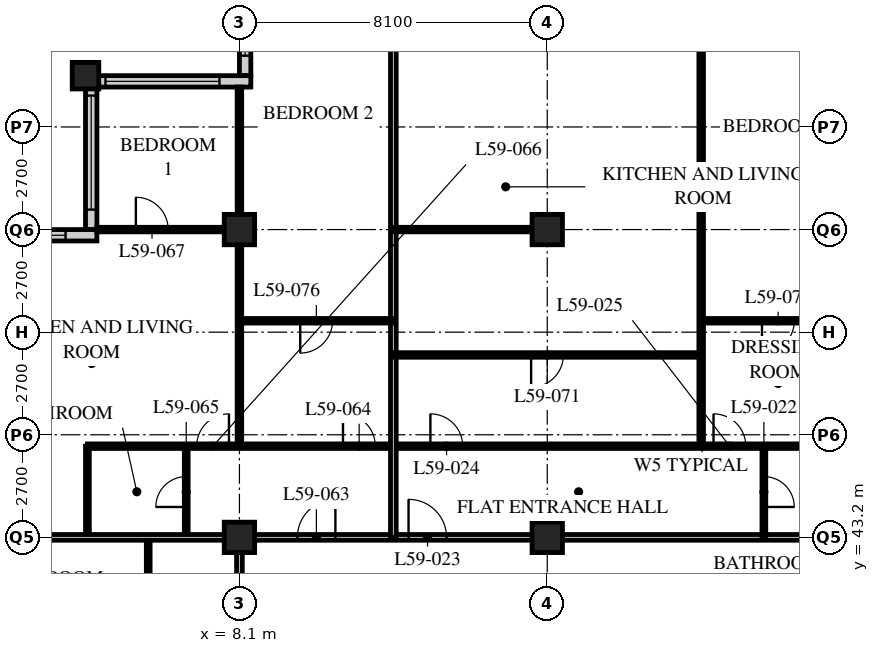
"""IFC4 building model, lengths in metres.
Left out: names, types, materials, properties, quantities, classifications, styles, units other than length and angle.
Written with IfcOpenShell. Run it as: python <this file> out.ifc"""

import sys

from ifc_helpers import new_model, si_unit, direction, frame, frame_2d, origin, origin_2d, place, context, subcontext, project, spatial, rectangle, hollow_rectangle, extrude, element, fill, save


model = new_model("IFC4")
c1 = context("Model", 3, precision=1e-05, world=origin(), true_north=direction((0.0, 1.0)))
c2 = subcontext(c1, "Body", "Model", "MODEL_VIEW")
j1 = project(units=[si_unit("LENGTHUNIT", "METRE"), si_unit("PLANEANGLEUNIT", "RADIAN")], contexts=[c1])
p1 = place(None, origin())
s1 = spatial("IfcSite", under=j1, at=p1, CompositionType="ELEMENT")
p2 = place(p1, origin())
s2 = spatial("IfcBuilding", under=s1, at=p2, CompositionType="ELEMENT")
p3 = place(p2, frame((0.0, 0.0, 228.0)))
s3 = spatial("IfcBuildingStorey", under=s2, at=p3, CompositionType="ELEMENT", Elevation=228.0)
p4 = place(p3, frame((4.05, 55.35, 0.0), z_axis=(0.0, 0.0, 1.0), x_axis=(1.0, 0.0, 0.0)))
e1 = element("IfcColumn", 1, at=p4, inside=s3, PredefinedType="COLUMN", context=c2, shape_type="SweptSolid", body=[
    extrude(hollow_rectangle(XDim=0.7, YDim=0.7, WallThickness=0.07, at=origin_2d()), origin(), (0.0, 0.0, 1.0), 3.6),
])
for number, where, z_axis, x_axis in (
    (2, (8.1, 43.2, 0.0), (0.0, 0.0, 1.0), (1.0, 0.0, 0.0)),
    (3, (8.1, 51.3, 0.0), (0.0, 0.0, 1.0), (1.0, 0.0, 0.0)),
    (4, (16.2, 43.2, 0.0), (0.0, 0.0, 1.0), (1.0, 0.0, 0.0)),
    (5, (16.2, 51.3, 0.0), (0.0, 0.0, 1.0), (1.0, 0.0, 0.0)),
):
    element("IfcColumn", number, at=place(p3, frame(where, z_axis=z_axis, x_axis=x_axis)), inside=s3, PredefinedType="COLUMN", context=c2, shape_type="SweptSolid", body=[
        extrude(hollow_rectangle(XDim=0.8, YDim=0.8, WallThickness=0.08, at=origin_2d()), origin(), (0.0, 0.0, 1.0), 3.6),
    ])
p5 = place(p3, frame((8.25, 59.1, 0.0), z_axis=(0.0, 0.0, 1.0), x_axis=(0.0, -1.0, 0.0)))
e6 = element("IfcWall", 6, at=p5, inside=s3, PredefinedType="SOLIDWALL", context=c2, shape_type="SweptSolid", body=[
    extrude(rectangle(XDim=3.75, YDim=0.3, at=frame_2d((1.875, 0.0))), origin(), (0.0, 0.0, 1.0), 3.39),
])
p6 = place(p5, frame((0.225, 0.0, 0.6)))
e7 = element("IfcOpeningElement", 7, at=p6, cuts=e6, PredefinedType="OPENING", context=c2, shape_type="SweptSolid", body=[
    extrude(rectangle(XDim=3.0, YDim=2.0, at=frame_2d((1.5, 1.0))), frame((0.0, 0.16, 0.0), z_axis=(0.0, -1.0, 0.0), x_axis=(1.0, 0.0, 0.0)), (0.0, 0.0, 1.0), 0.32),
])
p7 = place(p3, frame((8.4, 55.2, 0.0), z_axis=(0.0, 0.0, 1.0), x_axis=(-1.0, 0.0, 0.0)))
e8 = element("IfcWall", 8, at=p7, inside=s3, PredefinedType="SOLIDWALL", context=c2, shape_type="SweptSolid", body=[
    extrude(rectangle(XDim=4.35, YDim=0.3, at=frame_2d((2.175, 0.0))), origin(), (0.0, 0.0, 1.0), 3.39),
])
p8 = place(p7, frame((0.825, 0.0, 0.6)))
e9 = element("IfcOpeningElement", 9, at=p8, cuts=e8, PredefinedType="OPENING", context=c2, shape_type="SweptSolid", body=[
    extrude(rectangle(XDim=3.0, YDim=2.0, at=frame_2d((1.5, 1.0))), frame((0.0, 0.16, 0.0), z_axis=(0.0, -1.0, 0.0), x_axis=(1.0, 0.0, 0.0)), (0.0, 0.0, 1.0), 0.32),
])
p9 = place(p3, frame((4.2, 55.05, 0.0), z_axis=(0.0, 0.0, 1.0), x_axis=(0.0, -1.0, 0.0)))
e10 = element("IfcWall", 10, at=p9, inside=s3, PredefinedType="SOLIDWALL", context=c2, shape_type="SweptSolid", body=[
    extrude(rectangle(XDim=3.75, YDim=0.3, at=frame_2d((1.875, 0.0))), origin(), (0.0, 0.0, 1.0), 3.39),
])
p10 = place(p9, frame((0.225, 0.0, 0.6)))
e11 = element("IfcOpeningElement", 11, at=p10, cuts=e10, PredefinedType="OPENING", context=c2, shape_type="SweptSolid", body=[
    extrude(rectangle(XDim=3.0, YDim=2.0, at=frame_2d((1.5, 1.0))), frame((0.0, 0.16, 0.0), z_axis=(0.0, -1.0, 0.0), x_axis=(1.0, 0.0, 0.0)), (0.0, 0.0, 1.0), 0.32),
])
p11 = place(p3, frame((4.35, 51.15, 0.0), z_axis=(0.0, 0.0, 1.0), x_axis=(-1.0, 0.0, 0.0)))
e12 = element("IfcWall", 12, at=p11, inside=s3, PredefinedType="SOLIDWALL", context=c2, shape_type="SweptSolid", body=[
    extrude(rectangle(XDim=4.35, YDim=0.3, at=frame_2d((2.175, 0.0))), origin(), (0.0, 0.0, 1.0), 3.39),
])
p12 = place(p11, frame((0.825, 0.0, 0.6)))
e13 = element("IfcOpeningElement", 13, at=p12, cuts=e12, PredefinedType="OPENING", context=c2, shape_type="SweptSolid", body=[
    extrude(rectangle(XDim=3.0, YDim=2.0, at=frame_2d((1.5, 1.0))), frame((0.0, 0.16, 0.0), z_axis=(0.0, -1.0, 0.0), x_axis=(1.0, 0.0, 0.0)), (0.0, 0.0, 1.0), 0.32),
])
p13 = place(p3, frame((8.1, 43.2, 0.0), z_axis=(0.0, 0.0, 1.0), x_axis=(1.0, 0.0, 0.0)))
e14 = element("IfcWall", 14, at=p13, inside=s3, PredefinedType="PARTITIONING", context=c2, shape_type="SweptSolid", body=[
    extrude(rectangle(XDim=36.45, YDim=0.15, at=frame_2d((18.225, 0.0))), origin(), (0.0, 0.0, 1.0), 2.628),
])
p14 = place(p13, frame((4.45, 0.0, 0.0)))
e15 = element("IfcOpeningElement", 15, at=p14, cuts=e14, PredefinedType="OPENING", context=c2, shape_type="SweptSolid", body=[
    extrude(rectangle(XDim=1.0, YDim=2.1, at=frame_2d((0.5, 1.05))), frame((0.0, 0.085, 0.0), z_axis=(0.0, -1.0, 0.0), x_axis=(1.0, 0.0, 0.0)), (0.0, 0.0, 1.0), 0.17),
])
p15 = place(p13, frame((17.1, 0.0, 0.0)))
e16 = element("IfcOpeningElement", 16, at=p15, cuts=e14, PredefinedType="OPENING", context=c2, shape_type="SweptSolid", body=[
    extrude(rectangle(XDim=1.0, YDim=2.1, at=frame_2d((0.5, 1.05))), frame((0.0, 0.085, 0.0), z_axis=(0.0, -1.0, 0.0), x_axis=(1.0, 0.0, 0.0)), (0.0, 0.0, 1.0), 0.17),
])
p16 = place(p13, frame((29.05, 0.0, 0.0)))
e17 = element("IfcOpeningElement", 17, at=p16, cuts=e14, PredefinedType="OPENING", context=c2, shape_type="SweptSolid", body=[
    extrude(rectangle(XDim=1.0, YDim=2.1, at=frame_2d((0.5, 1.05))), frame((0.0, 0.085, 0.0), z_axis=(0.0, -1.0, 0.0), x_axis=(1.0, 0.0, 0.0)), (0.0, 0.0, 1.0), 0.17),
])
p17 = place(p13, frame((33.925, 0.0, 0.0)))
e18 = element("IfcOpeningElement", 18, at=p17, cuts=e14, PredefinedType="OPENING", context=c2, shape_type="SweptSolid", body=[
    extrude(rectangle(XDim=1.0, YDim=2.1, at=frame_2d((0.5, 1.05))), frame((0.0, 0.085, 0.0), z_axis=(0.0, -1.0, 0.0), x_axis=(1.0, 0.0, 0.0)), (0.0, 0.0, 1.0), 0.17),
])
p18 = place(p13, frame((1.525, 0.0, 0.0)))
e19 = element("IfcOpeningElement", 19, at=p18, cuts=e14, PredefinedType="OPENING", context=c2, shape_type="SweptSolid", body=[
    extrude(rectangle(XDim=1.0, YDim=2.1, at=frame_2d((0.5, 1.05))), frame((0.0, 0.085, 0.0), z_axis=(0.0, -1.0, 0.0), x_axis=(1.0, 0.0, 0.0)), (0.0, 0.0, 1.0), 0.17),
])
p19 = place(p3, frame((8.1, 18.9, 0.0), z_axis=(0.0, 0.0, 1.0), x_axis=(0.0, 1.0, 0.0)))
e20 = element("IfcWall", 20, at=p19, inside=s3, PredefinedType="PARTITIONING", context=c2, shape_type="SweptSolid", body=[
    extrude(rectangle(XDim=24.3, YDim=0.15, at=frame_2d((12.15, 0.0))), origin(), (0.0, 0.0, 1.0), 2.628),
])
p20 = place(p19, frame((0.9, 0.0, 0.0)))
e21 = element("IfcOpeningElement", 21, at=p20, cuts=e20, PredefinedType="OPENING", context=c2, shape_type="SweptSolid", body=[
    extrude(rectangle(XDim=1.0, YDim=2.1, at=frame_2d((0.5, 1.05))), frame((0.0, 0.085, 0.0), z_axis=(0.0, -1.0, 0.0), x_axis=(1.0, 0.0, 0.0)), (0.0, 0.0, 1.0), 0.17),
])
p21 = place(p19, frame((20.95, 0.0, 0.0)))
e22 = element("IfcOpeningElement", 22, at=p21, cuts=e20, PredefinedType="OPENING", context=c2, shape_type="SweptSolid", body=[
    extrude(rectangle(XDim=1.0, YDim=2.1, at=frame_2d((0.5, 1.05))), frame((0.0, 0.085, 0.0), z_axis=(0.0, -1.0, 0.0), x_axis=(1.0, 0.0, 0.0)), (0.0, 0.0, 1.0), 0.17),
])
p22 = place(p3, frame((21.9, 43.2, 0.0), z_axis=(0.0, 0.0, 1.0), x_axis=(0.0, 1.0, 0.0)))
e23 = element("IfcWall", 23, at=p22, inside=s3, PredefinedType="PARTITIONING", context=c2, shape_type="SweptSolid", body=[
    extrude(rectangle(XDim=2.4, YDim=0.1, at=frame_2d((1.2, 0.0))), origin(), (0.0, 0.0, 1.0), 3.39),
])
p23 = place(p22, frame((0.8, 0.0, 0.0)))
e24 = element("IfcOpeningElement", 24, at=p23, cuts=e23, PredefinedType="OPENING", context=c2, shape_type="SweptSolid", body=[
    extrude(rectangle(XDim=0.8, YDim=2.1, at=frame_2d((0.4, 1.05))), frame((0.0, 0.06, 0.0), z_axis=(0.0, -1.0, 0.0), x_axis=(1.0, 0.0, 0.0)), (0.0, 0.0, 1.0), 0.12),
])
p24 = place(p3, frame((20.25, 45.6, 0.0), z_axis=(0.0, 0.0, 1.0), x_axis=(0.0, 1.0, 0.0)))
e25 = element("IfcWall", 25, at=p24, inside=s3, PredefinedType="PARTITIONING", context=c2, shape_type="SweptSolid", body=[
    extrude(rectangle(XDim=13.5, YDim=0.12, at=frame_2d((6.75, 0.0))), origin(), (0.0, 0.0, 1.0), 3.39),
])
p25 = place(p3, frame((5.7, 41.0, 0.0), z_axis=(0.0, 0.0, 1.0), x_axis=(0.0, 1.0, 0.0)))
e26 = element("IfcWall", 26, at=p25, inside=s3, PredefinedType="PARTITIONING", context=c2, shape_type="SweptSolid", body=[
    extrude(rectangle(XDim=2.2, YDim=0.1, at=frame_2d((1.1, 0.0))), origin(), (0.0, 0.0, 1.0), 3.39),
])
p26 = place(p3, frame((6.7, 43.2, 0.0), z_axis=(0.0, 0.0, 1.0), x_axis=(0.0, 1.0, 0.0)))
e27 = element("IfcWall", 27, at=p26, inside=s3, PredefinedType="PARTITIONING", context=c2, shape_type="SweptSolid", body=[
    extrude(rectangle(XDim=2.4, YDim=0.1, at=frame_2d((1.2, 0.0))), origin(), (0.0, 0.0, 1.0), 3.39),
])
p27 = place(p26, frame((0.8, 0.0, 0.0)))
e28 = element("IfcOpeningElement", 28, at=p27, cuts=e27, PredefinedType="OPENING", context=c2, shape_type="SweptSolid", body=[
    extrude(rectangle(XDim=0.8, YDim=2.1, at=frame_2d((0.4, 1.05))), frame((0.0, 0.06, 0.0), z_axis=(0.0, -1.0, 0.0), x_axis=(1.0, 0.0, 0.0)), (0.0, 0.0, 1.0), 0.12),
])
p28 = place(p3, frame((4.1, 43.2, 0.0), z_axis=(0.0, 0.0, 1.0), x_axis=(0.0, 1.0, 0.0)))
e29 = element("IfcWall", 29, at=p28, inside=s3, PredefinedType="PARTITIONING", context=c2, shape_type="SweptSolid", body=[
    extrude(rectangle(XDim=2.4, YDim=0.1, at=frame_2d((1.2, 0.0))), origin(), (0.0, 0.0, 1.0), 3.39),
])
p29 = place(p3, frame((4.1, 45.6, 0.0), z_axis=(0.0, 0.0, 1.0), x_axis=(1.0, 0.0, 0.0)))
e30 = element("IfcWall", 30, at=p29, inside=s3, PredefinedType="PARTITIONING", context=c2, shape_type="SweptSolid", body=[
    extrude(rectangle(XDim=32.35, YDim=0.12, at=frame_2d((16.175, 0.0))), origin(), (0.0, 0.0, 1.0), 3.39),
])
p30 = place(p29, frame((9.025, 0.0, 0.0)))
e31 = element("IfcOpeningElement", 31, at=p30, cuts=e30, PredefinedType="OPENING", context=c2, shape_type="SweptSolid", body=[
    extrude(rectangle(XDim=0.85, YDim=2.1, at=frame_2d((0.425, 1.05))), frame((0.0, 0.07, 0.0), z_axis=(0.0, -1.0, 0.0), x_axis=(1.0, 0.0, 0.0)), (0.0, 0.0, 1.0), 0.14),
])
p31 = place(p29, frame((16.475, 0.0, 0.0)))
e32 = element("IfcOpeningElement", 32, at=p31, cuts=e30, PredefinedType="OPENING", context=c2, shape_type="SweptSolid", body=[
    extrude(rectangle(XDim=0.85, YDim=2.1, at=frame_2d((0.425, 1.05))), frame((0.0, 0.07, 0.0), z_axis=(0.0, -1.0, 0.0), x_axis=(1.0, 0.0, 0.0)), (0.0, 0.0, 1.0), 0.14),
])
p32 = place(p29, frame((21.175, 0.0, 0.0)))
e33 = element("IfcOpeningElement", 33, at=p32, cuts=e30, PredefinedType="OPENING", context=c2, shape_type="SweptSolid", body=[
    extrude(rectangle(XDim=0.85, YDim=2.1, at=frame_2d((0.425, 1.05))), frame((0.0, 0.07, 0.0), z_axis=(0.0, -1.0, 0.0), x_axis=(1.0, 0.0, 0.0)), (0.0, 0.0, 1.0), 0.14),
])
p33 = place(p29, frame((28.625, 0.0, 0.0)))
e34 = element("IfcOpeningElement", 34, at=p33, cuts=e30, PredefinedType="OPENING", context=c2, shape_type="SweptSolid", body=[
    extrude(rectangle(XDim=0.85, YDim=2.1, at=frame_2d((0.425, 1.05))), frame((0.0, 0.07, 0.0), z_axis=(0.0, -1.0, 0.0), x_axis=(1.0, 0.0, 0.0)), (0.0, 0.0, 1.0), 0.14),
])
p34 = place(p29, frame((6.725, 0.0, 0.0)))
e35 = element("IfcOpeningElement", 35, at=p34, cuts=e30, PredefinedType="OPENING", context=c2, shape_type="SweptSolid", body=[
    extrude(rectangle(XDim=0.85, YDim=2.1, at=frame_2d((0.425, 1.05))), frame((0.0, 0.07, 0.0), z_axis=(0.0, -1.0, 0.0), x_axis=(1.0, 0.0, 0.0)), (0.0, 0.0, 1.0), 0.14),
])
p35 = place(p29, frame((2.875, 0.0, 0.0)))
e36 = element("IfcOpeningElement", 36, at=p35, cuts=e30, PredefinedType="OPENING", context=c2, shape_type="SweptSolid", body=[
    extrude(rectangle(XDim=0.85, YDim=2.1, at=frame_2d((0.425, 1.05))), frame((0.0, 0.07, 0.0), z_axis=(0.0, -1.0, 0.0), x_axis=(1.0, 0.0, 0.0)), (0.0, 0.0, 1.0), 0.14),
])
p36 = place(p3, frame((8.1, 45.6, 0.0), z_axis=(0.0, 0.0, 1.0), x_axis=(0.0, 1.0, 0.0)))
e37 = element("IfcWall", 37, at=p36, inside=s3, PredefinedType="PARTITIONING", context=c2, shape_type="SweptSolid", body=[
    extrude(rectangle(XDim=9.45, YDim=0.12, at=frame_2d((4.725, 0.0))), origin(), (0.0, 0.0, 1.0), 2.628),
])
p37 = place(p3, frame((8.1, 51.3, 0.0), z_axis=(0.0, 0.0, 1.0), x_axis=(-1.0, 0.0, 0.0)))
e38 = element("IfcWall", 38, at=p37, inside=s3, PredefinedType="PARTITIONING", context=c2, shape_type="SweptSolid", body=[
    extrude(rectangle(XDim=3.75, YDim=0.12, at=frame_2d((1.875, 0.0))), origin(), (0.0, 0.0, 1.0), 2.628),
])
p38 = place(p37, frame((1.875, 0.0, 0.0)))
e39 = element("IfcOpeningElement", 39, at=p38, cuts=e38, PredefinedType="OPENING", context=c2, shape_type="SweptSolid", body=[
    extrude(rectangle(XDim=0.85, YDim=2.1, at=frame_2d((0.425, 1.05))), frame((0.0, 0.07, 0.0), z_axis=(0.0, -1.0, 0.0), x_axis=(1.0, 0.0, 0.0)), (0.0, 0.0, 1.0), 0.14),
])
p39 = place(p3, frame((0.3, 43.2, 0.0), z_axis=(0.0, 0.0, 1.0), x_axis=(1.0, 0.0, 0.0)))
e40 = element("IfcWall", 40, at=p39, inside=s3, PredefinedType="PARTITIONING", context=c2, shape_type="SweptSolid", body=[
    extrude(rectangle(XDim=7.8, YDim=0.15, at=frame_2d((3.9, 0.0))), origin(), (0.0, 0.0, 1.0), 2.628),
])
p40 = place(p3, frame((12.15, 43.2, 0.0), z_axis=(0.0, 0.0, 1.0), x_axis=(0.0, 1.0, 0.0)))
e41 = element("IfcWall", 41, at=p40, inside=s3, PredefinedType="PARTITIONING", context=c2, shape_type="SweptSolid", body=[
    extrude(rectangle(XDim=15.9, YDim=0.15, at=frame_2d((7.95, 0.0))), origin(), (0.0, 0.0, 1.0), 3.39),
])
p41 = place(p3, frame((12.15, 48.0, 0.0), z_axis=(0.0, 0.0, 1.0), x_axis=(1.0, 0.0, 0.0)))
e42 = element("IfcWall", 42, at=p41, inside=s3, PredefinedType="PARTITIONING", context=c2, shape_type="SweptSolid", body=[
    extrude(rectangle(XDim=8.1, YDim=0.12, at=frame_2d((4.05, 0.0))), origin(), (0.0, 0.0, 1.0), 3.39),
])
p42 = place(p41, frame((3.625, 0.0, 0.0)))
e43 = element("IfcOpeningElement", 43, at=p42, cuts=e42, PredefinedType="OPENING", context=c2, shape_type="SweptSolid", body=[
    extrude(rectangle(XDim=0.85, YDim=2.1, at=frame_2d((0.425, 1.05))), frame((0.0, 0.07, 0.0), z_axis=(0.0, -1.0, 0.0), x_axis=(1.0, 0.0, 0.0)), (0.0, 0.0, 1.0), 0.14),
])
p43 = place(p3, frame((20.25, 48.9, 0.0), z_axis=(0.0, 0.0, 1.0), x_axis=(1.0, 0.0, 0.0)))
e44 = element("IfcWall", 44, at=p43, inside=s3, PredefinedType="PARTITIONING", context=c2, shape_type="SweptSolid", body=[
    extrude(rectangle(XDim=4.05, YDim=0.12, at=frame_2d((2.025, 0.0))), origin(), (0.0, 0.0, 1.0), 3.39),
])
p44 = place(p43, frame((1.6, 0.0, 0.0)))
e45 = element("IfcOpeningElement", 45, at=p44, cuts=e44, PredefinedType="OPENING", context=c2, shape_type="SweptSolid", body=[
    extrude(rectangle(XDim=0.85, YDim=2.1, at=frame_2d((0.425, 1.05))), frame((0.0, 0.07, 0.0), z_axis=(0.0, -1.0, 0.0), x_axis=(1.0, 0.0, 0.0)), (0.0, 0.0, 1.0), 0.14),
])
p45 = place(p3, frame((8.1, 48.9, 0.0), z_axis=(0.0, 0.0, 1.0), x_axis=(1.0, 0.0, 0.0)))
e46 = element("IfcWall", 46, at=p45, inside=s3, PredefinedType="PARTITIONING", context=c2, shape_type="SweptSolid", body=[
    extrude(rectangle(XDim=4.05, YDim=0.12, at=frame_2d((2.025, 0.0))), origin(), (0.0, 0.0, 1.0), 3.39),
])
p46 = place(p45, frame((1.6, 0.0, 0.0)))
e47 = element("IfcOpeningElement", 47, at=p46, cuts=e46, PredefinedType="OPENING", context=c2, shape_type="SweptSolid", body=[
    extrude(rectangle(XDim=0.85, YDim=2.1, at=frame_2d((0.425, 1.05))), frame((0.0, 0.07, 0.0), z_axis=(0.0, -1.0, 0.0), x_axis=(1.0, 0.0, 0.0)), (0.0, 0.0, 1.0), 0.14),
])
p47 = place(p3, frame((12.15, 51.3, 0.0), z_axis=(0.0, 0.0, 1.0), x_axis=(1.0, 0.0, 0.0)))
e48 = element("IfcWall", 48, at=p47, inside=s3, PredefinedType="PARTITIONING", context=c2, shape_type="SweptSolid", body=[
    extrude(rectangle(XDim=3.65, YDim=0.12, at=frame_2d((1.825, 0.0))), origin(), (0.0, 0.0, 1.0), 2.628),
])
p48 = place(p6, origin())
e49 = element("IfcWindow", 49, at=p48, inside=s3, PartitioningType="SINGLE_PANEL", PredefinedType="WINDOW", context=c2, shape_type="SweptSolid", body=[
    extrude(rectangle(XDim=3.0, YDim=2.0, at=frame_2d((1.5, 1.0))), frame((0.0, 0.03, 0.0), z_axis=(0.0, -1.0, 0.0), x_axis=(1.0, 0.0, 0.0)), (0.0, 0.0, 1.0), 0.06),
])
fill(e7, e49)
p49 = place(p8, origin())
e50 = element("IfcWindow", 50, at=p49, inside=s3, PartitioningType="SINGLE_PANEL", PredefinedType="WINDOW", context=c2, shape_type="SweptSolid", body=[
    extrude(rectangle(XDim=3.0, YDim=2.0, at=frame_2d((1.5, 1.0))), frame((0.0, 0.03, 0.0), z_axis=(0.0, -1.0, 0.0), x_axis=(1.0, 0.0, 0.0)), (0.0, 0.0, 1.0), 0.06),
])
fill(e9, e50)
p50 = place(p10, origin())
e51 = element("IfcWindow", 51, at=p50, inside=s3, PartitioningType="SINGLE_PANEL", PredefinedType="WINDOW", context=c2, shape_type="SweptSolid", body=[
    extrude(rectangle(XDim=3.0, YDim=2.0, at=frame_2d((1.5, 1.0))), frame((0.0, 0.03, 0.0), z_axis=(0.0, -1.0, 0.0), x_axis=(1.0, 0.0, 0.0)), (0.0, 0.0, 1.0), 0.06),
])
fill(e11, e51)
p51 = place(p12, origin())
e52 = element("IfcWindow", 52, at=p51, inside=s3, PartitioningType="SINGLE_PANEL", PredefinedType="WINDOW", context=c2, shape_type="SweptSolid", body=[
    extrude(rectangle(XDim=3.0, YDim=2.0, at=frame_2d((1.5, 1.0))), frame((0.0, 0.03, 0.0), z_axis=(0.0, -1.0, 0.0), x_axis=(1.0, 0.0, 0.0)), (0.0, 0.0, 1.0), 0.06),
])
fill(e13, e52)
p52 = place(p23, origin())
e53 = element("IfcDoor", 53, at=p52, inside=s3, OperationType="SINGLE_SWING_RIGHT", PredefinedType="DOOR", context=c2, shape_type="SweptSolid", body=[
    extrude(rectangle(XDim=0.8, YDim=2.1, at=frame_2d((0.4, 1.05))), frame((0.0, 0.025, 0.0), z_axis=(0.0, -1.0, 0.0), x_axis=(1.0, 0.0, 0.0)), (0.0, 0.0, 1.0), 0.05),
])
fill(e24, e53)
p53 = place(p14, origin())
e54 = element("IfcDoor", 54, at=p53, inside=s3, OperationType="SINGLE_SWING_LEFT", PredefinedType="DOOR", context=c2, shape_type="SweptSolid", body=[
    extrude(rectangle(XDim=1.0, YDim=2.1, at=frame_2d((0.5, 1.05))), frame((0.0, 0.025, 0.0), z_axis=(0.0, -1.0, 0.0), x_axis=(1.0, 0.0, 0.0)), (0.0, 0.0, 1.0), 0.05),
])
fill(e15, e54)
p54 = place(p30, origin())
e55 = element("IfcDoor", 55, at=p54, inside=s3, OperationType="SINGLE_SWING_LEFT", PredefinedType="DOOR", context=c2, shape_type="SweptSolid", body=[
    extrude(rectangle(XDim=0.85, YDim=2.1, at=frame_2d((0.425, 1.05))), frame((0.0, 0.025, 0.0), z_axis=(0.0, -1.0, 0.0), x_axis=(1.0, 0.0, 0.0)), (0.0, 0.0, 1.0), 0.05),
])
fill(e31, e55)
p55 = place(p31, origin())
e56 = element("IfcDoor", 56, at=p55, inside=s3, OperationType="SINGLE_SWING_LEFT", PredefinedType="DOOR", context=c2, shape_type="SweptSolid", body=[
    extrude(rectangle(XDim=0.85, YDim=2.1, at=frame_2d((0.425, 1.05))), frame((0.0, 0.025, 0.0), z_axis=(0.0, -1.0, 0.0), x_axis=(1.0, 0.0, 0.0)), (0.0, 0.0, 1.0), 0.05),
])
fill(e32, e56)
p56 = place(p18, origin())
e57 = element("IfcDoor", 57, at=p56, inside=s3, OperationType="SINGLE_SWING_RIGHT", PredefinedType="DOOR", context=c2, shape_type="SweptSolid", body=[
    extrude(rectangle(XDim=1.0, YDim=2.1, at=frame_2d((0.5, 1.05))), frame((0.0, 0.025, 0.0), z_axis=(0.0, -1.0, 0.0), x_axis=(1.0, 0.0, 0.0)), (0.0, 0.0, 1.0), 0.05),
])
fill(e19, e57)
p57 = place(p34, origin())
e58 = element("IfcDoor", 58, at=p57, inside=s3, OperationType="SINGLE_SWING_LEFT", PredefinedType="DOOR", context=c2, shape_type="SweptSolid", body=[
    extrude(rectangle(XDim=0.85, YDim=2.1, at=frame_2d((0.425, 1.05))), frame((0.0, 0.025, 0.0), z_axis=(0.0, -1.0, 0.0), x_axis=(1.0, 0.0, 0.0)), (0.0, 0.0, 1.0), 0.05),
])
fill(e35, e58)
p58 = place(p27, origin())
e59 = element("IfcDoor", 59, at=p58, inside=s3, OperationType="SINGLE_SWING_LEFT", PredefinedType="DOOR", context=c2, shape_type="SweptSolid", body=[
    extrude(rectangle(XDim=0.8, YDim=2.1, at=frame_2d((0.4, 1.05))), frame((0.0, 0.025, 0.0), z_axis=(0.0, -1.0, 0.0), x_axis=(1.0, 0.0, 0.0)), (0.0, 0.0, 1.0), 0.05),
])
fill(e28, e59)
p59 = place(p35, origin())
e60 = element("IfcDoor", 60, at=p59, inside=s3, OperationType="SINGLE_SWING_RIGHT", PredefinedType="DOOR", context=c2, shape_type="SweptSolid", body=[
    extrude(rectangle(XDim=0.85, YDim=2.1, at=frame_2d((0.425, 1.05))), frame((0.0, 0.025, 0.0), z_axis=(0.0, -1.0, 0.0), x_axis=(1.0, 0.0, 0.0)), (0.0, 0.0, 1.0), 0.05),
])
fill(e36, e60)
p60 = place(p38, origin())
e61 = element("IfcDoor", 61, at=p60, inside=s3, OperationType="SINGLE_SWING_LEFT", PredefinedType="DOOR", context=c2, shape_type="SweptSolid", body=[
    extrude(rectangle(XDim=0.85, YDim=2.1, at=frame_2d((0.425, 1.05))), frame((0.0, 0.025, 0.0), z_axis=(0.0, -1.0, 0.0), x_axis=(1.0, 0.0, 0.0)), (0.0, 0.0, 1.0), 0.05),
])
fill(e39, e61)
p61 = place(p42, origin())
e62 = element("IfcDoor", 62, at=p61, inside=s3, OperationType="SINGLE_SWING_RIGHT", PredefinedType="DOOR", context=c2, shape_type="SweptSolid", body=[
    extrude(rectangle(XDim=0.85, YDim=2.1, at=frame_2d((0.425, 1.05))), frame((0.0, 0.025, 0.0), z_axis=(0.0, -1.0, 0.0), x_axis=(1.0, 0.0, 0.0)), (0.0, 0.0, 1.0), 0.05),
])
fill(e43, e62)
p62 = place(p44, origin())
e63 = element("IfcDoor", 63, at=p62, inside=s3, OperationType="SINGLE_SWING_RIGHT", PredefinedType="DOOR", context=c2, shape_type="SweptSolid", body=[
    extrude(rectangle(XDim=0.85, YDim=2.1, at=frame_2d((0.425, 1.05))), frame((0.0, 0.025, 0.0), z_axis=(0.0, -1.0, 0.0), x_axis=(1.0, 0.0, 0.0)), (0.0, 0.0, 1.0), 0.05),
])
fill(e45, e63)
p63 = place(p46, origin())
e64 = element("IfcDoor", 64, at=p63, inside=s3, OperationType="SINGLE_SWING_RIGHT", PredefinedType="DOOR", context=c2, shape_type="SweptSolid", body=[
    extrude(rectangle(XDim=0.85, YDim=2.1, at=frame_2d((0.425, 1.05))), frame((0.0, 0.025, 0.0), z_axis=(0.0, -1.0, 0.0), x_axis=(1.0, 0.0, 0.0)), (0.0, 0.0, 1.0), 0.05),
])
fill(e47, e64)
save(model, sys.argv[1])
